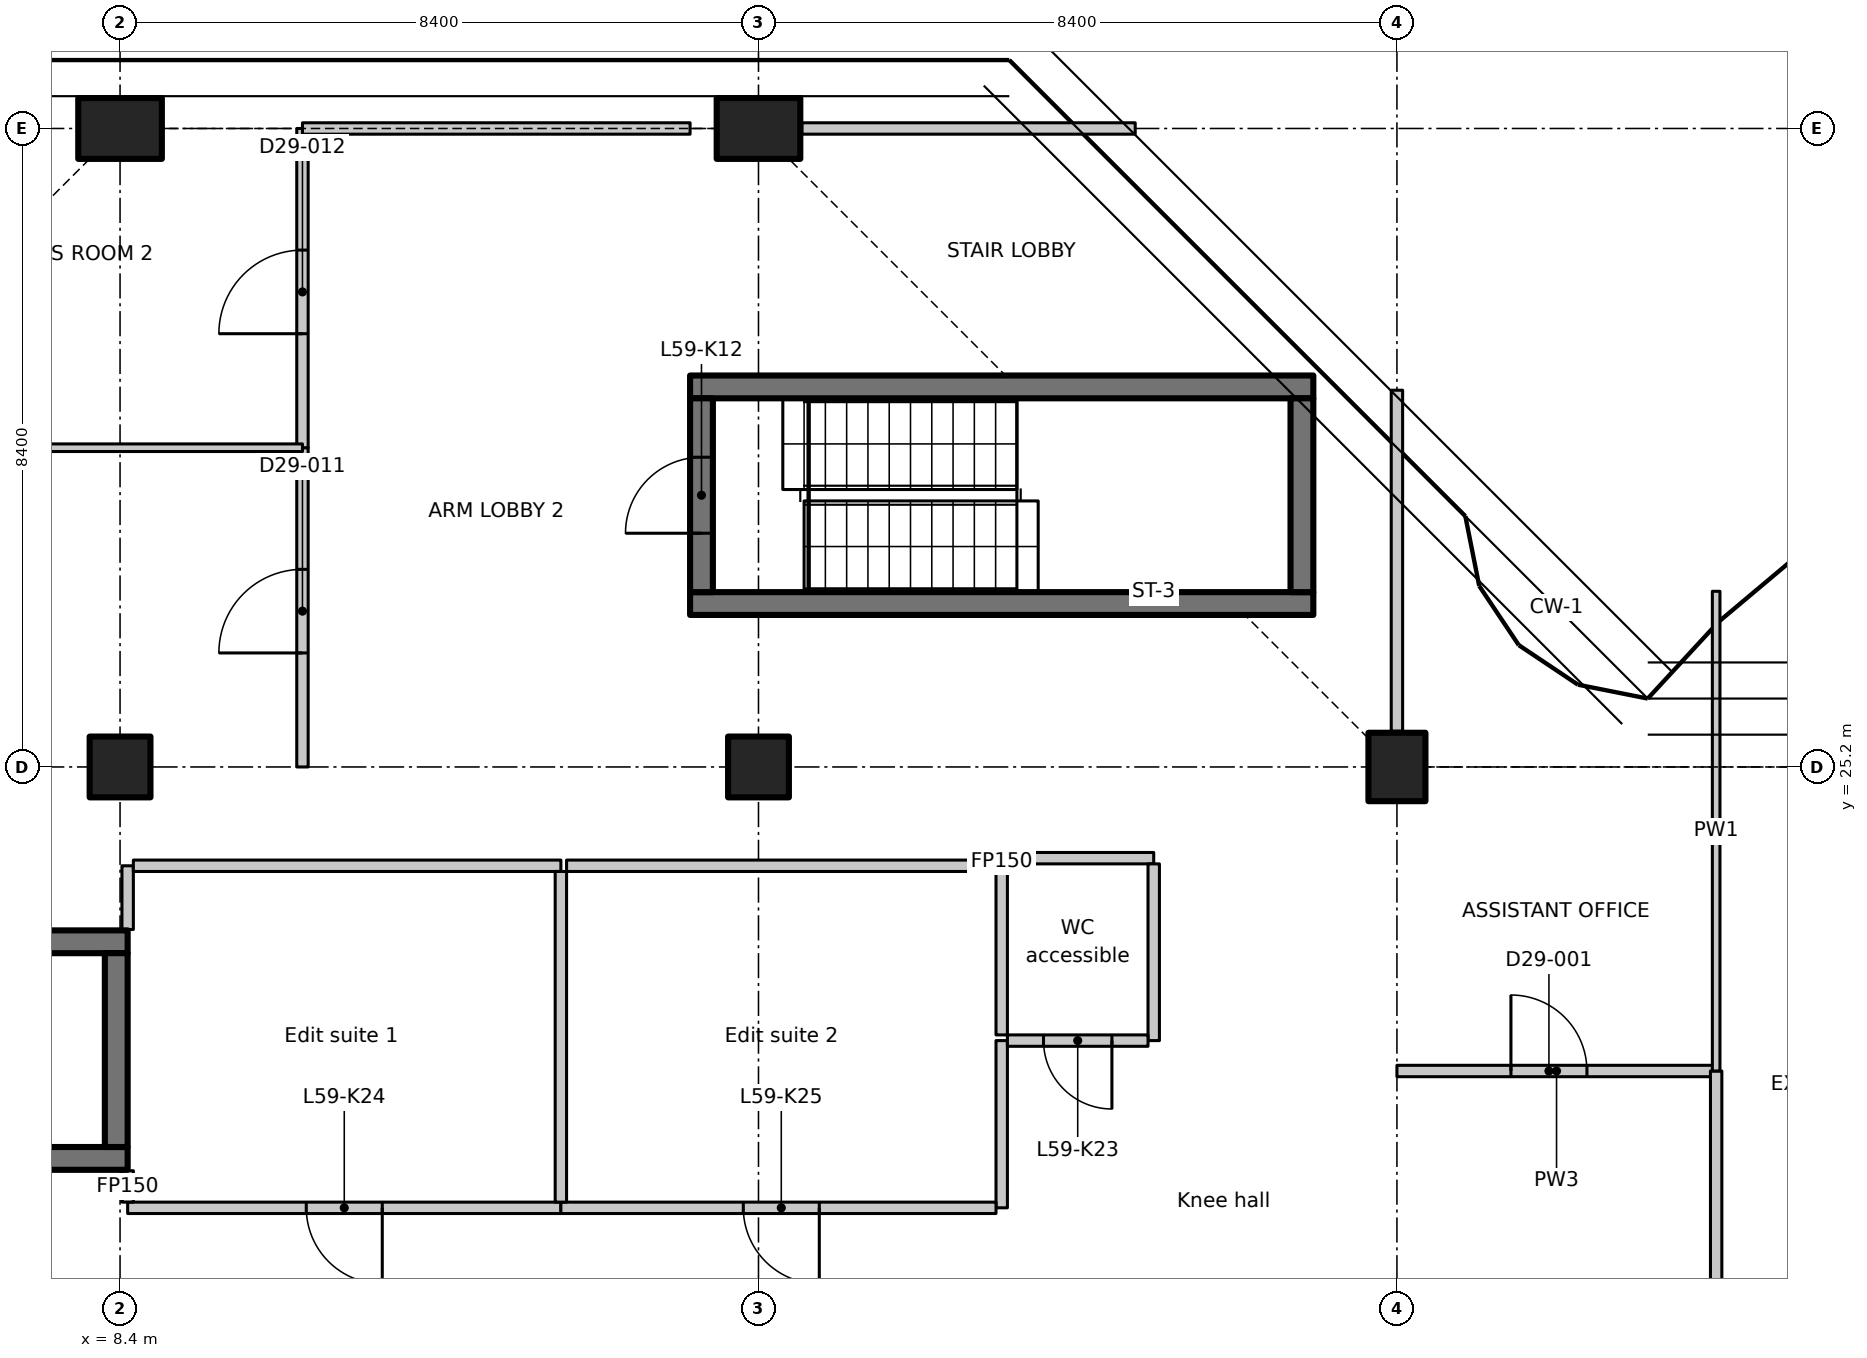
"""IFC4 building model, lengths in metres.
Left out: names, types, materials, properties, quantities, classifications, styles, units other than length and angle.
Written with IfcOpenShell. Run it as: python <this file> out.ifc"""

import sys

from ifc_helpers import new_model, si_unit, direction, frame, frame_2d, origin, origin_2d, place, context, subcontext, project, spatial, polyline, rectangle, outline, extrude, element, fill, save


model = new_model("IFC4")
c1 = context("Model", 3, precision=1e-05, world=origin(), true_north=direction((0.0, 1.0)))
c2 = subcontext(c1, "Body", "Model", "MODEL_VIEW")
j1 = project(units=[si_unit("LENGTHUNIT", "METRE"), si_unit("PLANEANGLEUNIT", "RADIAN")], contexts=[c1])
p1 = place(None, origin())
s1 = spatial("IfcSite", under=j1, at=p1, CompositionType="ELEMENT")
p2 = place(p1, origin())
s2 = spatial("IfcBuilding", under=s1, at=p2, CompositionType="ELEMENT")
p3 = place(p2, frame((0.0, 0.0, 233.7)))
s3 = spatial("IfcBuildingStorey", under=s2, at=p3, CompositionType="ELEMENT", Elevation=233.7)
p4 = place(p3, frame((8.4, 25.2, 0.0), z_axis=(0.0, 0.0, 1.0), x_axis=(1.0, 0.0, 0.0)))
e1 = element("IfcColumn", 1, at=p4, inside=s3, PredefinedType="COLUMN", context=c2, shape_type="SweptSolid", body=[
    extrude(rectangle(XDim=0.8, YDim=0.8, at=origin_2d()), origin(), (0.0, 0.0, 1.0), 3.35),
])
p5 = place(p3, frame((8.4, 33.6, 0.0), z_axis=(0.0, 0.0, 1.0), x_axis=(0.0, 1.0, 0.0)))
e2 = element("IfcColumn", 2, at=p5, inside=s3, PredefinedType="COLUMN", context=c2, shape_type="SweptSolid", body=[
    extrude(rectangle(XDim=0.8, YDim=1.1, at=origin_2d()), origin(), (0.0, 0.0, 1.0), 3.35),
])
p6 = place(p3, frame((16.8, 25.2, 0.0), z_axis=(0.0, 0.0, 1.0), x_axis=(1.0, 0.0, 0.0)))
e3 = element("IfcColumn", 3, at=p6, inside=s3, PredefinedType="COLUMN", context=c2, shape_type="SweptSolid", body=[
    extrude(rectangle(XDim=0.8, YDim=0.8, at=origin_2d()), origin(), (0.0, 0.0, 1.0), 3.35),
])
p7 = place(p3, frame((16.8, 33.6, 0.0), z_axis=(0.0, 0.0, 1.0), x_axis=(0.0, 1.0, 0.0)))
e4 = element("IfcColumn", 4, at=p7, inside=s3, PredefinedType="COLUMN", context=c2, shape_type="SweptSolid", body=[
    extrude(rectangle(XDim=0.8, YDim=1.1, at=origin_2d()), origin(), (0.0, 0.0, 1.0), 3.35),
])
p8 = place(p3, frame((25.2, 25.2, 0.0), z_axis=(0.0, 0.0, 1.0), x_axis=(1.0, 0.0, 0.0)))
e5 = element("IfcColumn", 5, at=p8, inside=s3, PredefinedType="COLUMN", context=c2, shape_type="SweptSolid", body=[
    extrude(rectangle(XDim=0.75, YDim=0.9, at=origin_2d()), origin(), (0.0, 0.0, 1.0), 3.35),
])
p9 = place(p3, frame((8.5, 20.05, 0.0), z_axis=(0.0, 0.0, 1.0), x_axis=(-1.0, 0.0, 0.0)))
e6 = element("IfcWall", 6, at=p9, inside=s3, PredefinedType="SHEAR", context=c2, shape_type="SweptSolid", body=[
    extrude(rectangle(XDim=8.2, YDim=0.3, at=frame_2d((4.1, 0.0))), origin(), (0.0, 0.0, 1.0), 3.35),
])
p10 = place(p9, frame((6.8, 0.0, 0.0)))
e7 = element("IfcOpeningElement", 7, at=p10, cuts=e6, PredefinedType="OPENING", context=c2, shape_type="SweptSolid", body=[
    extrude(rectangle(XDim=1.0, YDim=2.1, at=frame_2d((0.5, 1.05))), frame((0.0, 0.16, 0.0), z_axis=(0.0, -1.0, 0.0), x_axis=(1.0, 0.0, 0.0)), (0.0, 0.0, 1.0), 0.32),
])
p11 = place(p3, frame((0.3, 22.9, 0.0), z_axis=(0.0, 0.0, 1.0), x_axis=(1.0, 0.0, 0.0)))
e8 = element("IfcWall", 8, at=p11, inside=s3, PredefinedType="SHEAR", context=c2, shape_type="SweptSolid", body=[
    extrude(rectangle(XDim=8.2, YDim=0.3, at=frame_2d((4.1, 0.0))), origin(), (0.0, 0.0, 1.0), 3.35),
])
p12 = place(p11, frame((0.4, 0.0, 0.0)))
e9 = element("IfcOpeningElement", 9, at=p12, cuts=e8, PredefinedType="OPENING", context=c2, shape_type="SweptSolid", body=[
    extrude(rectangle(XDim=1.0, YDim=2.1, at=frame_2d((0.5, 1.05))), frame((0.0, 0.16, 0.0), z_axis=(0.0, -1.0, 0.0), x_axis=(1.0, 0.0, 0.0)), (0.0, 0.0, 1.0), 0.32),
])
p13 = place(p3, frame((8.35, 20.2, 0.0), z_axis=(0.0, 0.0, 1.0), x_axis=(0.0, 1.0, 0.0)))
e10 = element("IfcWall", 10, at=p13, inside=s3, PredefinedType="SHEAR", context=c2, shape_type="SweptSolid", body=[
    extrude(rectangle(XDim=2.55, YDim=0.3, at=frame_2d((1.275, 0.0))), origin(), (0.0, 0.0, 1.0), 3.35),
])
for number, where, z_axis, x_axis in (
    (11, (15.9, 27.35, 0.0), (0.0, 0.0, 1.0), (1.0, 0.0, 0.0)),
    (12, (15.9, 30.2, 0.0), (0.0, 0.0, 1.0), (1.0, 0.0, 0.0)),
):
    element("IfcWall", number, at=place(p3, frame(where, z_axis=z_axis, x_axis=x_axis)), inside=s3, PredefinedType="SHEAR", context=c2, shape_type="SweptSolid", body=[
        extrude(rectangle(XDim=8.2, YDim=0.3, at=frame_2d((4.1, 0.0))), origin(), (0.0, 0.0, 1.0), 3.35),
    ])
p14 = place(p3, frame((16.05, 27.5, 0.0), z_axis=(0.0, 0.0, 1.0), x_axis=(0.0, 1.0, 0.0)))
e13 = element("IfcWall", 13, at=p14, inside=s3, PredefinedType="SHEAR", context=c2, shape_type="SweptSolid", body=[
    extrude(rectangle(XDim=2.55, YDim=0.3, at=frame_2d((1.275, 0.0))), origin(), (0.0, 0.0, 1.0), 3.35),
])
p15 = place(p14, frame((0.775, 0.0, 0.0)))
e14 = element("IfcOpeningElement", 14, at=p15, cuts=e13, PredefinedType="OPENING", context=c2, shape_type="SweptSolid", body=[
    extrude(rectangle(XDim=1.0, YDim=2.1, at=frame_2d((0.5, 1.05))), frame((0.0, 0.16, 0.0), z_axis=(0.0, -1.0, 0.0), x_axis=(1.0, 0.0, 0.0)), (0.0, 0.0, 1.0), 0.32),
])
p16 = place(p3, frame((23.95, 27.5, 0.0), z_axis=(0.0, 0.0, 1.0), x_axis=(0.0, 1.0, 0.0)))
e15 = element("IfcWall", 15, at=p16, inside=s3, PredefinedType="SHEAR", context=c2, shape_type="SweptSolid", body=[
    extrude(rectangle(XDim=2.55, YDim=0.3, at=frame_2d((1.275, 0.0))), origin(), (0.0, 0.0, 1.0), 3.35),
])
p17 = place(p3, frame((14.2, 19.4, 0.0), z_axis=(0.0, 0.0, 1.0), x_axis=(-1.0, 0.0, 0.0)))
e16 = element("IfcWall", 16, at=p17, inside=s3, PredefinedType="PARTITIONING", context=c2, shape_type="SweptSolid", body=[
    extrude(rectangle(XDim=5.7, YDim=0.15, at=frame_2d((2.85, 0.0))), origin(), (0.0, 0.0, 1.0), 3.35),
])
p18 = place(p17, frame((2.35, 0.0, 0.0)))
e17 = element("IfcOpeningElement", 17, at=p18, cuts=e16, PredefinedType="OPENING", context=c2, shape_type="SweptSolid", body=[
    extrude(rectangle(XDim=1.0, YDim=2.1, at=frame_2d((0.5, 1.05))), frame((0.0, 0.085, 0.0), z_axis=(0.0, -1.0, 0.0), x_axis=(1.0, 0.0, 0.0)), (0.0, 0.0, 1.0), 0.17),
])
p19 = place(p3, frame((8.5, 19.475, 0.0), z_axis=(0.0, 0.0, 1.0), x_axis=(0.0, 1.0, 0.0)))
e18 = element("IfcWall", 18, at=p19, inside=s3, PredefinedType="PARTITIONING", context=c2, shape_type="SweptSolid", body=[
    extrude(rectangle(XDim=0.413, YDim=0.15, at=frame_2d((0.207, 0.0))), origin(), (0.0, 0.0, 1.0), 3.35),
])
p20 = place(p3, frame((8.5, 23.062, 0.0), z_axis=(0.0, 0.0, 1.0), x_axis=(0.0, 1.0, 0.0)))
e19 = element("IfcWall", 19, at=p20, inside=s3, PredefinedType="PARTITIONING", context=c2, shape_type="SweptSolid", body=[
    extrude(rectangle(XDim=0.838, YDim=0.15, at=frame_2d((0.419, 0.0))), origin(), (0.0, 0.0, 1.0), 3.35),
])
p21 = place(p3, frame((8.575, 23.9, 0.0), z_axis=(0.0, 0.0, 1.0), x_axis=(1.0, 0.0, 0.0)))
e20 = element("IfcWall", 20, at=p21, inside=s3, PredefinedType="PARTITIONING", context=c2, shape_type="SweptSolid", body=[
    extrude(rectangle(XDim=5.625, YDim=0.15, at=frame_2d((2.812, 0.0))), origin(), (0.0, 0.0, 1.0), 3.35),
])
p22 = place(p3, frame((20.0, 21.6, 0.0), z_axis=(0.0, 0.0, 1.0), x_axis=(0.0, -1.0, 0.0)))
e21 = element("IfcWall", 21, at=p22, inside=s3, PredefinedType="PARTITIONING", context=c2, shape_type="SweptSolid", body=[
    extrude(rectangle(XDim=2.2, YDim=0.15, at=frame_2d((1.1, 0.0))), origin(), (0.0, 0.0, 1.0), 3.35),
])
p23 = place(p3, frame((19.925, 19.4, 0.0), z_axis=(0.0, 0.0, 1.0), x_axis=(-1.0, 0.0, 0.0)))
e22 = element("IfcWall", 22, at=p23, inside=s3, PredefinedType="PARTITIONING", context=c2, shape_type="SweptSolid", body=[
    extrude(rectangle(XDim=5.725, YDim=0.15, at=frame_2d((2.863, 0.0))), origin(), (0.0, 0.0, 1.0), 3.35),
])
p24 = place(p23, frame((2.325, 0.0, 0.0)))
e23 = element("IfcOpeningElement", 23, at=p24, cuts=e22, PredefinedType="OPENING", context=c2, shape_type="SweptSolid", body=[
    extrude(rectangle(XDim=1.0, YDim=2.1, at=frame_2d((0.5, 1.05))), frame((0.0, 0.085, 0.0), z_axis=(0.0, -1.0, 0.0), x_axis=(1.0, 0.0, 0.0)), (0.0, 0.0, 1.0), 0.17),
])
p25 = place(p3, frame((14.2, 23.825, 0.0), z_axis=(0.0, 0.0, 1.0), x_axis=(0.0, -1.0, 0.0)))
e24 = element("IfcWall", 24, at=p25, inside=s3, PredefinedType="PARTITIONING", context=c2, shape_type="SweptSolid", body=[
    extrude(rectangle(XDim=4.35, YDim=0.15, at=frame_2d((2.175, 0.0))), origin(), (0.0, 0.0, 1.0), 3.35),
])
p26 = place(p3, frame((14.275, 23.9, 0.0), z_axis=(0.0, 0.0, 1.0), x_axis=(1.0, 0.0, 0.0)))
e25 = element("IfcWall", 25, at=p26, inside=s3, PredefinedType="PARTITIONING", context=c2, shape_type="SweptSolid", body=[
    extrude(rectangle(XDim=5.725, YDim=0.15, at=frame_2d((2.863, 0.0))), origin(), (0.0, 0.0, 1.0), 3.35),
])
p27 = place(p3, frame((20.0, 23.9, 0.0), z_axis=(0.0, 0.0, 1.0), x_axis=(0.0, 1.0, 0.0)))
e26 = element("IfcWall", 26, at=p27, inside=s3, PredefinedType="PARTITIONING", context=c2, shape_type="SweptSolid", body=[
    extrude(rectangle(XDim=0.1, YDim=0.15, at=frame_2d((0.05, 0.0))), origin(), (0.0, 0.0, 1.0), 3.35),
])
p28 = place(p3, frame((20.075, 24.0, 0.0), z_axis=(0.0, 0.0, 1.0), x_axis=(1.0, 0.0, 0.0)))
e27 = element("IfcWall", 27, at=p28, inside=s3, PredefinedType="PARTITIONING", context=c2, shape_type="SweptSolid", body=[
    extrude(rectangle(XDim=1.925, YDim=0.15, at=frame_2d((0.962, 0.0))), origin(), (0.0, 0.0, 1.0), 3.35),
])
p29 = place(p3, frame((22.0, 23.925, 0.0), z_axis=(0.0, 0.0, 1.0), x_axis=(0.0, -1.0, 0.0)))
e28 = element("IfcWall", 28, at=p29, inside=s3, PredefinedType="PARTITIONING", context=c2, shape_type="SweptSolid", body=[
    extrude(rectangle(XDim=2.325, YDim=0.15, at=frame_2d((1.163, 0.0))), origin(), (0.0, 0.0, 1.0), 3.35),
])
p30 = place(p3, frame((21.925, 21.6, 0.0), z_axis=(0.0, 0.0, 1.0), x_axis=(-1.0, 0.0, 0.0)))
e29 = element("IfcWall", 29, at=p30, inside=s3, PredefinedType="PARTITIONING", context=c2, shape_type="SweptSolid", body=[
    extrude(rectangle(XDim=1.85, YDim=0.15, at=frame_2d((0.925, 0.0))), origin(), (0.0, 0.0, 1.0), 3.35),
])
p31 = place(p30, frame((0.475, 0.0, 0.0)))
e30 = element("IfcOpeningElement", 30, at=p31, cuts=e29, PredefinedType="OPENING", context=c2, shape_type="SweptSolid", body=[
    extrude(rectangle(XDim=0.9, YDim=2.1, at=frame_2d((0.45, 1.05))), frame((0.0, 0.085, 0.0), z_axis=(0.0, -1.0, 0.0), x_axis=(1.0, 0.0, 0.0)), (0.0, 0.0, 1.0), 0.17),
])
p32 = place(p3, frame((20.0, 21.675, 0.0), z_axis=(0.0, 0.0, 1.0), x_axis=(0.0, 1.0, 0.0)))
e31 = element("IfcWall", 31, at=p32, inside=s3, PredefinedType="PARTITIONING", context=c2, shape_type="SweptSolid", body=[
    extrude(rectangle(XDim=2.15, YDim=0.15, at=frame_2d((1.075, 0.0))), origin(), (0.0, 0.0, 1.0), 3.35),
])
p33 = place(p3, frame((25.2, 21.2, 0.0), z_axis=(0.0, 0.0, 1.0), x_axis=(1.0, 0.0, 0.0)))
e32 = element("IfcWall", 32, at=p33, inside=s3, PredefinedType="PARTITIONING", context=c2, shape_type="SweptSolid", body=[
    extrude(rectangle(XDim=4.2, YDim=0.15, at=frame_2d((2.1, 0.0))), origin(), (0.0, 0.0, 1.0), 3.33),
])
p34 = place(p33, frame((1.5, 0.0, 0.0)))
e33 = element("IfcOpeningElement", 33, at=p34, cuts=e32, PredefinedType="OPENING", context=c2, shape_type="SweptSolid", body=[
    extrude(rectangle(XDim=1.0, YDim=2.1, at=frame_2d((0.5, 1.05))), frame((0.0, 0.085, 0.0), z_axis=(0.0, -1.0, 0.0), x_axis=(1.0, 0.0, 0.0)), (0.0, 0.0, 1.0), 0.17),
])
p35 = place(p3, frame((29.4, 21.2, 0.0), z_axis=(0.0, 0.0, 1.0), x_axis=(0.0, -1.0, 0.0)))
e34 = element("IfcWall", 34, at=p35, inside=s3, PredefinedType="PARTITIONING", context=c2, shape_type="SweptSolid", body=[
    extrude(rectangle(XDim=8.2, YDim=0.15, at=frame_2d((4.1, 0.0))), origin(), (0.0, 0.0, 1.0), 3.33),
])
p36 = place(p35, frame((3.3, 0.0, 0.0)))
e35 = element("IfcOpeningElement", 35, at=p36, cuts=e34, PredefinedType="OPENING", context=c2, shape_type="SweptSolid", body=[
    extrude(rectangle(XDim=1.6, YDim=2.1, at=frame_2d((0.8, 1.05))), frame((0.0, 0.085, 0.0), z_axis=(0.0, -1.0, 0.0), x_axis=(1.0, 0.0, 0.0)), (0.0, 0.0, 1.0), 0.17),
])
p37 = place(p3, frame((29.4, 27.511, 0.0), z_axis=(0.0, 0.0, 1.0), x_axis=(0.0, -1.0, 0.0)))
e36 = element("IfcWall", 36, at=p37, inside=s3, PredefinedType="PARTITIONING", context=c2, shape_type="SweptSolid", body=[
    extrude(outline(polyline([(0.0, 0.0), (6.311, 0.0), (6.311, 3.33), (2.761, 3.33), (2.759, 2.98), (1.863, 2.98), (1.861, 3.33), (0.236, 3.33), (0.0, 3.33), (0.0, 0.0)])), frame((0.0, 0.05, 0.0), z_axis=(0.0, -1.0, 0.0), x_axis=(1.0, 0.0, 0.0)), (0.0, 0.0, 1.0), 0.1),
])
p38 = place(p3, frame((25.2, 25.67, 0.0), z_axis=(0.0, 0.0, 1.0), x_axis=(0.0, 1.0, 0.0)))
e37 = element("IfcWall", 37, at=p38, inside=s3, PredefinedType="PARTITIONING", context=c2, shape_type="SweptSolid", body=[
    extrude(rectangle(XDim=4.487, YDim=0.15, at=frame_2d((2.243, 0.0))), origin(), (0.0, 0.0, 1.0), 2.98),
])
p39 = place(p3, frame((10.8, 25.2, 0.0), z_axis=(0.0, 0.0, 1.0), x_axis=(0.0, 1.0, 0.0)))
e38 = element("IfcWall", 38, at=p39, inside=s3, PredefinedType="PARTITIONING", context=c2, shape_type="SweptSolid", body=[
    extrude(rectangle(XDim=4.2, YDim=0.15, at=frame_2d((2.1, 0.0))), origin(), (0.0, 0.0, 1.0), 3.33),
])
p40 = place(p39, frame((1.5, 0.0, 0.0)))
e39 = element("IfcOpeningElement", 39, at=p40, cuts=e38, PredefinedType="OPENING", context=c2, shape_type="SweptSolid", body=[
    extrude(rectangle(XDim=1.1, YDim=2.1, at=frame_2d((0.55, 1.05))), frame((0.0, 0.085, 0.0), z_axis=(0.0, -1.0, 0.0), x_axis=(1.0, 0.0, 0.0)), (0.0, 0.0, 1.0), 0.17),
])
p41 = place(p3, frame((10.8, 29.4, 0.0), z_axis=(0.0, 0.0, 1.0), x_axis=(0.0, 1.0, 0.0)))
e40 = element("IfcWall", 40, at=p41, inside=s3, PredefinedType="PARTITIONING", context=c2, shape_type="SweptSolid", body=[
    extrude(rectangle(XDim=4.2, YDim=0.15, at=frame_2d((2.1, 0.0))), origin(), (0.0, 0.0, 1.0), 2.98),
])
p42 = place(p41, frame((1.5, 0.0, 0.0)))
e41 = element("IfcOpeningElement", 41, at=p42, cuts=e40, PredefinedType="OPENING", context=c2, shape_type="SweptSolid", body=[
    extrude(rectangle(XDim=1.1, YDim=2.1, at=frame_2d((0.55, 1.05))), frame((0.0, 0.085, 0.0), z_axis=(0.0, -1.0, 0.0), x_axis=(1.0, 0.0, 0.0)), (0.0, 0.0, 1.0), 0.17),
])
p43 = place(p3, frame((10.8, 33.6, 0.0), z_axis=(0.0, 0.0, 1.0), x_axis=(1.0, 0.0, 0.0)))
e42 = element("IfcWall", 42, at=p43, inside=s3, PredefinedType="PARTITIONING", context=c2, shape_type="SweptSolid", body=[
    extrude(outline(polyline([(0.0, 0.0), (5.1, 0.0), (5.1, 2.98), (0.0, 2.98), (0.0, 0.0)])), frame((0.0, 0.075, 0.0), z_axis=(0.0, -1.0, 0.0), x_axis=(1.0, 0.0, 0.0)), (0.0, 0.0, 1.0), 0.15),
])
p44 = place(p3, frame((17.37, 33.6, 0.0), z_axis=(0.0, 0.0, 1.0), x_axis=(1.0, 0.0, 0.0)))
e43 = element("IfcWall", 43, at=p44, inside=s3, PredefinedType="PARTITIONING", context=c2, shape_type="SweptSolid", body=[
    extrude(rectangle(XDim=4.386, YDim=0.15, at=frame_2d((2.193, 0.0))), origin(), (0.0, 0.0, 1.0), 2.98),
])
p45 = place(p3, frame((-0.605, 29.4, 0.0), z_axis=(0.0, 0.0, 1.0), x_axis=(1.0, 0.0, 0.0)))
e44 = element("IfcWall", 44, at=p45, inside=s3, PredefinedType="PARTITIONING", context=c2, shape_type="SweptSolid", body=[
    extrude(outline(polyline([(0.0, 0.0), (11.406, 0.0), (11.406, 3.33), (5.471, 3.33), (5.469, 2.98), (4.142, 2.98), (4.14, 3.33), (0.406, 3.33), (0.0, 3.33), (0.0, 0.0)])), frame((0.0, 0.05, 0.0), z_axis=(0.0, -1.0, 0.0), x_axis=(1.0, 0.0, 0.0)), (0.0, 0.0, 1.0), 0.1),
])
p46 = place(p15, origin())
e45 = element("IfcDoor", 45, at=p46, inside=s3, OperationType="SINGLE_SWING_LEFT", PredefinedType="DOOR", context=c2, shape_type="SweptSolid", body=[
    extrude(rectangle(XDim=1.0, YDim=2.1, at=frame_2d((0.5, 1.05))), frame((0.0, 0.025, 0.0), z_axis=(0.0, -1.0, 0.0), x_axis=(1.0, 0.0, 0.0)), (0.0, 0.0, 1.0), 0.05),
])
fill(e14, e45)
p47 = place(p31, origin())
e46 = element("IfcDoor", 46, at=p47, inside=s3, OperationType="SINGLE_SWING_RIGHT", PredefinedType="DOOR", context=c2, shape_type="SweptSolid", body=[
    extrude(rectangle(XDim=0.9, YDim=2.1, at=frame_2d((0.45, 1.05))), frame((0.0, 0.025, 0.0), z_axis=(0.0, -1.0, 0.0), x_axis=(1.0, 0.0, 0.0)), (0.0, 0.0, 1.0), 0.05),
])
fill(e30, e46)
p48 = place(p18, origin())
e47 = element("IfcDoor", 47, at=p48, inside=s3, OperationType="SINGLE_SWING_LEFT", PredefinedType="DOOR", context=c2, shape_type="SweptSolid", body=[
    extrude(rectangle(XDim=1.0, YDim=2.1, at=frame_2d((0.5, 1.05))), frame((0.0, 0.025, 0.0), z_axis=(0.0, -1.0, 0.0), x_axis=(1.0, 0.0, 0.0)), (0.0, 0.0, 1.0), 0.05),
])
fill(e17, e47)
p49 = place(p24, origin())
e48 = element("IfcDoor", 48, at=p49, inside=s3, OperationType="SINGLE_SWING_RIGHT", PredefinedType="DOOR", context=c2, shape_type="SweptSolid", body=[
    extrude(rectangle(XDim=1.0, YDim=2.1, at=frame_2d((0.5, 1.05))), frame((0.0, 0.025, 0.0), z_axis=(0.0, -1.0, 0.0), x_axis=(1.0, 0.0, 0.0)), (0.0, 0.0, 1.0), 0.05),
])
fill(e23, e48)
p50 = place(p34, origin())
e49 = element("IfcDoor", 49, at=p50, inside=s3, OperationType="SINGLE_SWING_LEFT", PredefinedType="DOOR", context=c2, shape_type="SweptSolid", body=[
    extrude(rectangle(XDim=1.0, YDim=2.1, at=frame_2d((0.5, 1.05))), frame((0.0, 0.025, 0.0), z_axis=(0.0, -1.0, 0.0), x_axis=(1.0, 0.0, 0.0)), (0.0, 0.0, 1.0), 0.05),
])
fill(e33, e49)
p51 = place(p40, origin())
e50 = element("IfcDoor", 50, at=p51, inside=s3, OperationType="SINGLE_SWING_LEFT", PredefinedType="DOOR", context=c2, shape_type="SweptSolid", body=[
    extrude(rectangle(XDim=1.1, YDim=2.1, at=frame_2d((0.55, 1.05))), frame((0.0, 0.025, 0.0), z_axis=(0.0, -1.0, 0.0), x_axis=(1.0, 0.0, 0.0)), (0.0, 0.0, 1.0), 0.05),
])
fill(e39, e50)
p52 = place(p42, origin())
e51 = element("IfcDoor", 51, at=p52, inside=s3, OperationType="SINGLE_SWING_LEFT", PredefinedType="DOOR", context=c2, shape_type="SweptSolid", body=[
    extrude(rectangle(XDim=1.1, YDim=2.1, at=frame_2d((0.55, 1.05))), frame((0.0, 0.025, 0.0), z_axis=(0.0, -1.0, 0.0), x_axis=(1.0, 0.0, 0.0)), (0.0, 0.0, 1.0), 0.05),
])
fill(e41, e51)
save(model, sys.argv[1])
